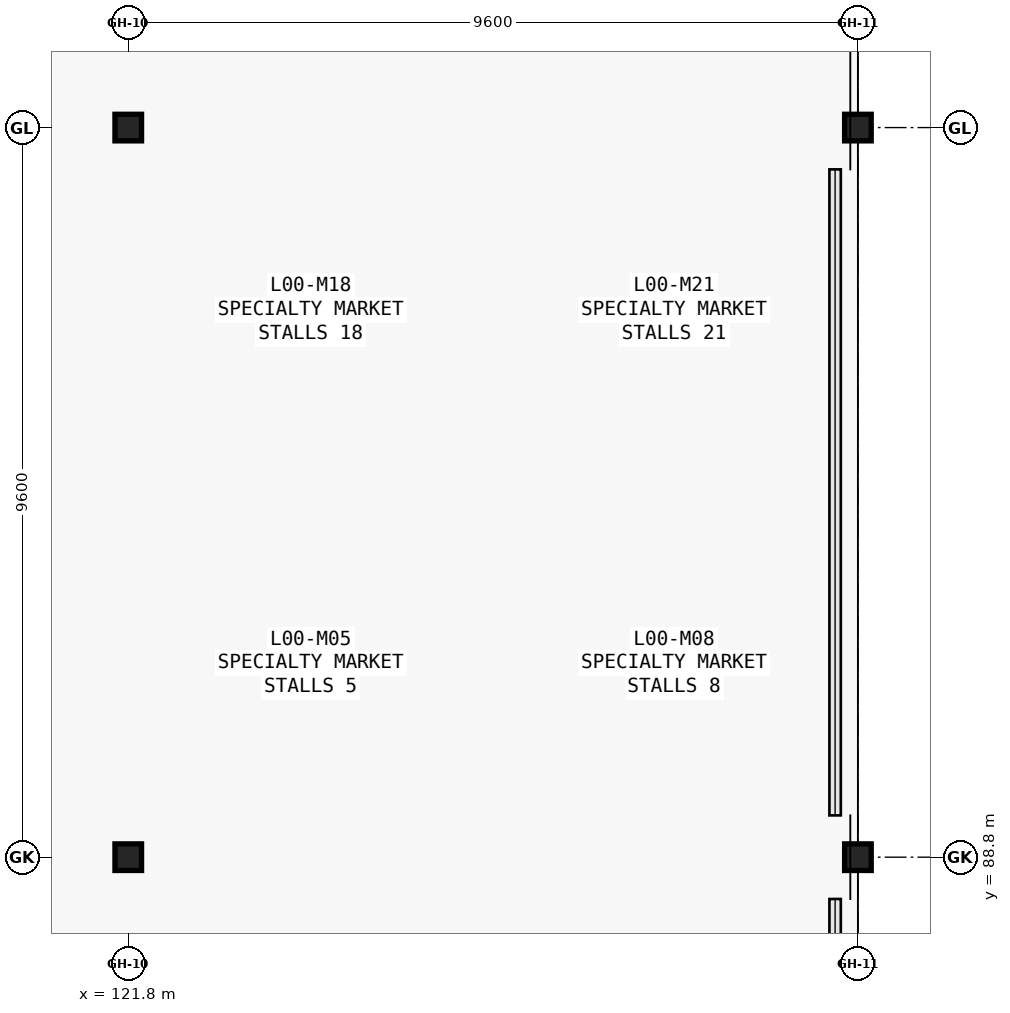
"""IFC4 building model, lengths in metres.
Left out: names, types, materials, properties, quantities, classifications, styles, units other than length and angle.
Written with IfcOpenShell. Run it as: python <this file> out.ifc"""

import sys

from ifc_helpers import new_model, si_unit, direction, frame, origin, origin_2d, place, context, subcontext, project, spatial, hollow_rectangle, i_section, extrude, element, save


model = new_model("IFC4")
c1 = context("Model", 3, precision=1e-05, world=origin(), true_north=direction((0.0, 1.0)))
c2 = subcontext(c1, "Body", "Model", "MODEL_VIEW")
j1 = project(units=[si_unit("LENGTHUNIT", "METRE"), si_unit("PLANEANGLEUNIT", "RADIAN")], contexts=[c1])
p1 = place(None, origin())
s1 = spatial("IfcSite", under=j1, at=p1, CompositionType="ELEMENT")
p2 = place(p1, origin())
s2 = spatial("IfcBuilding", under=s1, at=p2, CompositionType="ELEMENT")
p3 = place(p2, origin())
s3 = spatial("IfcBuildingStorey", under=s2, at=p3, CompositionType="ELEMENT", Elevation=0.0)
for number, where, z_axis, x_axis in (
    (1, (121.8, 88.8, 0.0), (0.0, 0.0, 1.0), (1.0, 0.0, 0.0)),
    (2, (121.8, 98.4, 0.0), (0.0, 0.0, 1.0), (1.0, 0.0, 0.0)),
):
    element("IfcColumn", number, at=place(p3, frame(where, z_axis=z_axis, x_axis=x_axis)), inside=s3, PredefinedType="COLUMN", context=c2, shape_type="SweptSolid", body=[
        extrude(i_section(OverallWidth=0.35, OverallDepth=0.35, WebThickness=0.012, FlangeThickness=0.019, FilletRadius=0.02, at=origin_2d()), origin(), (0.0, 0.0, 1.0), 6.0),
    ])
for number, where, z_axis, x_axis in (
    (3, (131.4, 88.8, 0.0), (0.0, 0.0, 1.0), (1.0, 0.0, 0.0)),
    (4, (131.4, 98.4, 0.0), (0.0, 0.0, 1.0), (1.0, 0.0, 0.0)),
):
    element("IfcColumn", number, at=place(p3, frame(where, z_axis=z_axis, x_axis=x_axis)), inside=s3, PredefinedType="COLUMN", context=c2, shape_type="SweptSolid", body=[
        extrude(hollow_rectangle(XDim=0.35, YDim=0.35, WallThickness=0.012, InnerFilletRadius=0.012, OuterFilletRadius=0.016, at=origin_2d()), origin(), (0.0, 0.0, 1.0), 6.0),
    ])
save(model, sys.argv[1])
